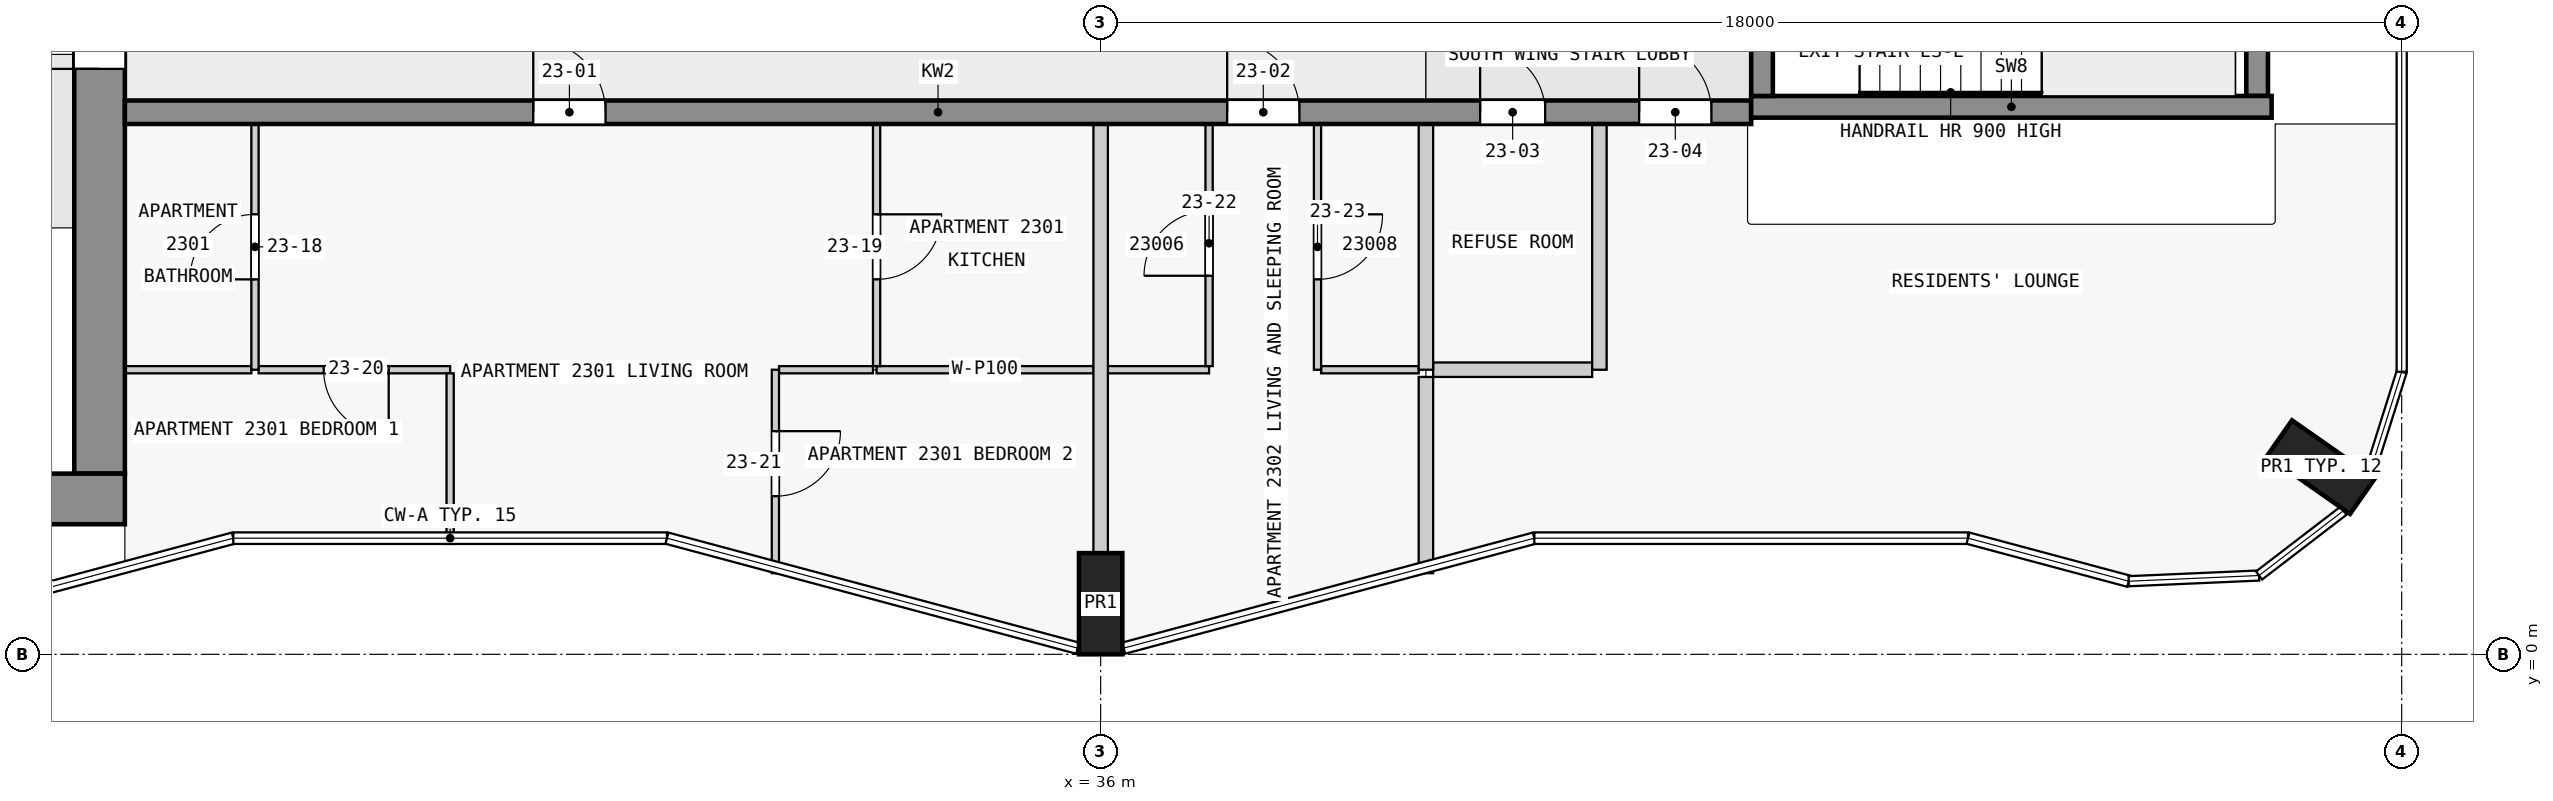
"""IFC4 building model, lengths in metres.
Left out: names, types, materials, properties, quantities, classifications, styles, units other than length and angle.
Written with IfcOpenShell. Run it as: python <this file> out.ifc"""

import sys

from ifc_helpers import new_model, si_unit, direction, frame, frame_2d, origin, origin_2d, place, context, subcontext, project, spatial, rectangle, extrude, element, fill, save


model = new_model("IFC4")
c1 = context("Model", 3, precision=1e-05, world=origin(), true_north=direction((0.0, 1.0)))
c2 = subcontext(c1, "Body", "Model", "MODEL_VIEW")
j1 = project(units=[si_unit("LENGTHUNIT", "METRE"), si_unit("PLANEANGLEUNIT", "RADIAN")], contexts=[c1])
p1 = place(None, origin())
s1 = spatial("IfcSite", under=j1, at=p1, CompositionType="ELEMENT")
p2 = place(p1, origin())
s2 = spatial("IfcBuilding", under=s1, at=p2, CompositionType="ELEMENT")
p3 = place(p2, frame((0.0, 0.0, 92.3)))
s3 = spatial("IfcBuildingStorey", under=s2, at=p3, CompositionType="ELEMENT", Elevation=92.3)
for number, where, z_axis, x_axis in (
    (1, (36.0, 0.7, 0.0), (0.0, 0.0, 1.0), (1.0, 0.0, 0.0)),
    (2, (52.884, 2.59, 0.0), (0.0, 0.0, 1.0), (0.574, 0.819, 0.0)),
):
    element("IfcColumn", number, at=place(p3, frame(where, z_axis=z_axis, x_axis=x_axis)), inside=s3, PredefinedType="COLUMN", context=c2, shape_type="SweptSolid", body=[
        extrude(rectangle(XDim=0.6, YDim=1.4, at=origin_2d()), origin(), (0.0, 0.0, 1.0), 3.5),
    ])
p4 = place(p3, frame((1.6, 2.15, 0.0), z_axis=(0.0, 0.0, 1.0), x_axis=(1.0, 0.0, 0.0)))
e3 = element("IfcWall", 3, at=p4, inside=s3, PredefinedType="SHEAR", context=c2, shape_type="SweptSolid", body=[
    extrude(rectangle(XDim=20.9, YDim=0.7, at=frame_2d((10.45, 0.0))), origin(), (0.0, 0.0, 1.0), 3.25),
])
p5 = place(p3, frame((22.15, 2.5, 0.0), z_axis=(0.0, 0.0, 1.0), x_axis=(0.0, 1.0, 0.0)))
e4 = element("IfcWall", 4, at=p5, inside=s3, PredefinedType="SHEAR", context=c2, shape_type="SweptSolid", body=[
    extrude(rectangle(XDim=14.8, YDim=0.7, at=frame_2d((7.4, 0.0))), origin(), (0.0, 0.0, 1.0), 3.25),
])
p6 = place(p5, frame((5.6, 0.0, 0.0)))
e5 = element("IfcOpeningElement", 5, at=p6, cuts=e4, PredefinedType="OPENING", context=c2, shape_type="SweptSolid", body=[
    extrude(rectangle(XDim=1.8, YDim=2.1, at=frame_2d((0.9, 1.05))), frame((0.0, 0.36, 0.0), z_axis=(0.0, -1.0, 0.0), x_axis=(1.0, 0.0, 0.0)), (0.0, 0.0, 1.0), 0.72),
])
p7 = place(p3, frame((45.15, 7.725, 0.0), z_axis=(0.0, 0.0, 1.0), x_axis=(0.0, 1.0, 0.0)))
e6 = element("IfcWall", 6, at=p7, inside=s3, PredefinedType="SHEAR", context=c2, shape_type="SweptSolid", body=[
    extrude(rectangle(XDim=2.55, YDim=0.3, at=frame_2d((1.275, 0.0))), origin(), (0.0, 0.0, 1.0), 3.5),
])
p8 = place(p7, frame((0.725, 0.0, 0.0)))
e7 = element("IfcOpeningElement", 7, at=p8, cuts=e6, PredefinedType="OPENING", context=c2, shape_type="SweptSolid", body=[
    extrude(rectangle(XDim=1.1, YDim=2.1, at=frame_2d((0.55, 1.05))), frame((0.0, 0.16, 0.0), z_axis=(0.0, -1.0, 0.0), x_axis=(1.0, 0.0, 0.0)), (0.0, 0.0, 1.0), 0.32),
])
p9 = place(p3, frame((52.0, 7.725, 0.0), z_axis=(0.0, 0.0, 1.0), x_axis=(0.0, 1.0, 0.0)))
e8 = element("IfcWall", 8, at=p9, inside=s3, PredefinedType="SHEAR", context=c2, shape_type="SweptSolid", body=[
    extrude(rectangle(XDim=2.55, YDim=0.3, at=frame_2d((1.275, 0.0))), origin(), (0.0, 0.0, 1.0), 3.5),
])
p10 = place(p3, frame((45.0, 7.575, 0.0), z_axis=(0.0, 0.0, 1.0), x_axis=(1.0, 0.0, 0.0)))
e9 = element("IfcWall", 9, at=p10, inside=s3, PredefinedType="SHEAR", context=c2, shape_type="SweptSolid", body=[
    extrude(rectangle(XDim=7.2, YDim=0.3, at=frame_2d((3.6, 0.0))), origin(), (0.0, 0.0, 1.0), 3.5),
])
p11 = place(p3, frame((22.5, 7.5, 0.0), z_axis=(0.0, 0.0, 1.0), x_axis=(1.0, 0.0, 0.0)))
e10 = element("IfcWall", 10, at=p11, inside=s3, PredefinedType="SHEAR", context=c2, shape_type="SweptSolid", body=[
    extrude(rectangle(XDim=22.5, YDim=0.325, at=frame_2d((11.25, 0.0))), origin(), (0.0, 0.0, 1.0), 3.25),
])
p12 = place(p11, frame((5.65, 0.0, 0.0)))
e11 = element("IfcOpeningElement", 11, at=p12, cuts=e10, PredefinedType="OPENING", context=c2, shape_type="SweptSolid", body=[
    extrude(rectangle(XDim=1.0, YDim=2.1, at=frame_2d((0.5, 1.05))), frame((0.0, 0.172, 0.0), z_axis=(0.0, -1.0, 0.0), x_axis=(1.0, 0.0, 0.0)), (0.0, 0.0, 1.0), 0.345),
])
p13 = place(p11, frame((15.25, 0.0, 0.0)))
e12 = element("IfcOpeningElement", 12, at=p13, cuts=e10, PredefinedType="OPENING", context=c2, shape_type="SweptSolid", body=[
    extrude(rectangle(XDim=1.0, YDim=2.1, at=frame_2d((0.5, 1.05))), frame((0.0, 0.172, 0.0), z_axis=(0.0, -1.0, 0.0), x_axis=(1.0, 0.0, 0.0)), (0.0, 0.0, 1.0), 0.345),
])
p14 = place(p11, frame((18.75, 0.0, 0.0)))
e13 = element("IfcOpeningElement", 13, at=p14, cuts=e10, PredefinedType="OPENING", context=c2, shape_type="SweptSolid", body=[
    extrude(rectangle(XDim=0.9, YDim=2.1, at=frame_2d((0.45, 1.05))), frame((0.0, 0.172, 0.0), z_axis=(0.0, -1.0, 0.0), x_axis=(1.0, 0.0, 0.0)), (0.0, 0.0, 1.0), 0.345),
])
p15 = place(p11, frame((20.95, 0.0, 0.0)))
e14 = element("IfcOpeningElement", 14, at=p15, cuts=e10, PredefinedType="OPENING", context=c2, shape_type="SweptSolid", body=[
    extrude(rectangle(XDim=1.0, YDim=2.1, at=frame_2d((0.5, 1.05))), frame((0.0, 0.172, 0.0), z_axis=(0.0, -1.0, 0.0), x_axis=(1.0, 0.0, 0.0)), (0.0, 0.0, 1.0), 0.345),
])
p16 = place(p3, frame((27.0, 3.938, 0.0), z_axis=(0.0, 0.0, 1.0), x_axis=(-1.0, 0.0, 0.0)))
e15 = element("IfcWall", 15, at=p16, inside=s3, PredefinedType="PARTITIONING", context=c2, shape_type="SweptSolid", body=[
    extrude(rectangle(XDim=2.65, YDim=0.1, at=frame_2d((1.325, 0.0))), origin(), (0.0, 0.0, 1.0), 3.25),
])
p17 = place(p16, frame((0.85, 0.0, 0.0)))
e16 = element("IfcOpeningElement", 16, at=p17, cuts=e15, PredefinedType="OPENING", context=c2, shape_type="SweptSolid", body=[
    extrude(rectangle(XDim=0.9, YDim=2.1, at=frame_2d((0.45, 1.05))), frame((0.0, 0.06, 0.0), z_axis=(0.0, -1.0, 0.0), x_axis=(1.0, 0.0, 0.0)), (0.0, 0.0, 1.0), 0.12),
])
p18 = place(p3, frame((32.85, 3.938, 0.0), z_axis=(0.0, 0.0, 1.0), x_axis=(-1.0, 0.0, 0.0)))
e17 = element("IfcWall", 17, at=p18, inside=s3, PredefinedType="PARTITIONING", context=c2, shape_type="SweptSolid", body=[
    extrude(rectangle(XDim=1.3, YDim=0.1, at=frame_2d((0.65, 0.0))), origin(), (0.0, 0.0, 1.0), 3.25),
])
p19 = place(p3, frame((22.5, 3.938, 0.0), z_axis=(0.0, 0.0, 1.0), x_axis=(1.0, 0.0, 0.0)))
e18 = element("IfcWall", 18, at=p19, inside=s3, PredefinedType="PARTITIONING", context=c2, shape_type="SweptSolid", body=[
    extrude(rectangle(XDim=1.75, YDim=0.1, at=frame_2d((0.875, 0.0))), origin(), (0.0, 0.0, 1.0), 3.25),
])
p20 = place(p3, frame((32.9, 3.938, 0.0), z_axis=(0.0, 0.0, 1.0), x_axis=(1.0, 0.0, 0.0)))
e19 = element("IfcWall", 19, at=p20, inside=s3, PredefinedType="PARTITIONING", context=c2, shape_type="SweptSolid", body=[
    extrude(rectangle(XDim=3.0, YDim=0.1, at=frame_2d((1.5, 0.0))), origin(), (0.0, 0.0, 1.0), 3.25),
])
p21 = place(p3, frame((36.1, 3.938, 0.0), z_axis=(0.0, 0.0, 1.0), x_axis=(1.0, 0.0, 0.0)))
e20 = element("IfcWall", 20, at=p21, inside=s3, PredefinedType="PARTITIONING", context=c2, shape_type="SweptSolid", body=[
    extrude(rectangle(XDim=1.4, YDim=0.1, at=frame_2d((0.7, 0.0))), origin(), (0.0, 0.0, 1.0), 3.25),
])
p22 = place(p3, frame((39.05, 3.938, 0.0), z_axis=(0.0, 0.0, 1.0), x_axis=(1.0, 0.0, 0.0)))
e21 = element("IfcWall", 21, at=p22, inside=s3, PredefinedType="PARTITIONING", context=c2, shape_type="SweptSolid", body=[
    extrude(rectangle(XDim=1.35, YDim=0.1, at=frame_2d((0.675, 0.0))), origin(), (0.0, 0.0, 1.0), 3.25),
])
p23 = place(p3, frame((40.6, 3.938, 0.0), z_axis=(0.0, 0.0, 1.0), x_axis=(1.0, 0.0, 0.0)))
e22 = element("IfcWall", 22, at=p23, inside=s3, PredefinedType="PARTITIONING", context=c2, shape_type="SweptSolid", body=[
    extrude(rectangle(XDim=2.2, YDim=0.2, at=frame_2d((1.1, 0.0))), origin(), (0.0, 0.0, 1.0), 3.25),
])
p24 = place(p3, frame((24.3, 3.938, 0.0), z_axis=(0.0, 0.0, 1.0), x_axis=(0.0, 1.0, 0.0)))
e23 = element("IfcWall", 23, at=p24, inside=s3, PredefinedType="PARTITIONING", context=c2, shape_type="SweptSolid", body=[
    extrude(rectangle(XDim=3.4, YDim=0.1, at=frame_2d((1.7, 0.0))), origin(), (0.0, 0.0, 1.0), 3.25),
])
p25 = place(p24, frame((1.25, 0.0, 0.0)))
e24 = element("IfcOpeningElement", 24, at=p25, cuts=e23, PredefinedType="OPENING", context=c2, shape_type="SweptSolid", body=[
    extrude(rectangle(XDim=0.9, YDim=2.1, at=frame_2d((0.45, 1.05))), frame((0.0, 0.06, 0.0), z_axis=(0.0, -1.0, 0.0), x_axis=(1.0, 0.0, 0.0)), (0.0, 0.0, 1.0), 0.12),
])
p26 = place(p3, frame((27.0, 1.527, 0.0), z_axis=(0.0, 0.0, 1.0), x_axis=(0.0, 1.0, 0.0)))
e25 = element("IfcWall", 25, at=p26, inside=s3, PredefinedType="PARTITIONING", context=c2, shape_type="SweptSolid", body=[
    extrude(rectangle(XDim=2.361, YDim=0.1, at=frame_2d((1.18, 0.0))), origin(), (0.0, 0.0, 1.0), 3.25),
])
p27 = place(p3, frame((31.5, 3.938, 0.0), z_axis=(0.0, 0.0, 1.0), x_axis=(0.0, -1.0, 0.0)))
e26 = element("IfcWall", 26, at=p27, inside=s3, PredefinedType="PARTITIONING", context=c2, shape_type="SweptSolid", body=[
    extrude(rectangle(XDim=2.815, YDim=0.1, at=frame_2d((1.408, 0.0))), origin(), (0.0, 0.0, 1.0), 3.25),
])
p28 = place(p27, frame((0.85, 0.0, 0.0)))
e27 = element("IfcOpeningElement", 27, at=p28, cuts=e26, PredefinedType="OPENING", context=c2, shape_type="SweptSolid", body=[
    extrude(rectangle(XDim=0.9, YDim=2.1, at=frame_2d((0.45, 1.05))), frame((0.0, 0.06, 0.0), z_axis=(0.0, -1.0, 0.0), x_axis=(1.0, 0.0, 0.0)), (0.0, 0.0, 1.0), 0.12),
])
p29 = place(p3, frame((32.9, 7.337, 0.0), z_axis=(0.0, 0.0, 1.0), x_axis=(0.0, -1.0, 0.0)))
e28 = element("IfcWall", 28, at=p29, inside=s3, PredefinedType="PARTITIONING", context=c2, shape_type="SweptSolid", body=[
    extrude(rectangle(XDim=3.35, YDim=0.1, at=frame_2d((1.675, 0.0))), origin(), (0.0, 0.0, 1.0), 3.25),
])
p30 = place(p29, frame((1.25, 0.0, 0.0)))
e29 = element("IfcOpeningElement", 29, at=p30, cuts=e28, PredefinedType="OPENING", context=c2, shape_type="SweptSolid", body=[
    extrude(rectangle(XDim=0.9, YDim=2.1, at=frame_2d((0.45, 1.05))), frame((0.0, 0.06, 0.0), z_axis=(0.0, -1.0, 0.0), x_axis=(1.0, 0.0, 0.0)), (0.0, 0.0, 1.0), 0.12),
])
p31 = place(p3, frame((36.0, 1.4, 0.0), z_axis=(0.0, 0.0, 1.0), x_axis=(0.0, 1.0, 0.0)))
e30 = element("IfcWall", 30, at=p31, inside=s3, PredefinedType="PARTITIONING", context=c2, shape_type="SweptSolid", body=[
    extrude(rectangle(XDim=5.938, YDim=0.2, at=frame_2d((2.969, 0.0))), origin(), (0.0, 0.0, 1.0), 3.25),
])
p32 = place(p3, frame((37.5, 3.988, 0.0), z_axis=(0.0, 0.0, 1.0), x_axis=(0.0, 1.0, 0.0)))
e31 = element("IfcWall", 31, at=p32, inside=s3, PredefinedType="PARTITIONING", context=c2, shape_type="SweptSolid", body=[
    extrude(rectangle(XDim=3.35, YDim=0.1, at=frame_2d((1.675, 0.0))), origin(), (0.0, 0.0, 1.0), 3.25),
])
p33 = place(p32, frame((1.25, 0.0, 0.0)))
e32 = element("IfcOpeningElement", 32, at=p33, cuts=e31, PredefinedType="OPENING", context=c2, shape_type="SweptSolid", body=[
    extrude(rectangle(XDim=0.9, YDim=2.1, at=frame_2d((0.45, 1.05))), frame((0.0, 0.06, 0.0), z_axis=(0.0, -1.0, 0.0), x_axis=(1.0, 0.0, 0.0)), (0.0, 0.0, 1.0), 0.12),
])
p34 = place(p3, frame((39.0, 7.337, 0.0), z_axis=(0.0, 0.0, 1.0), x_axis=(0.0, -1.0, 0.0)))
e33 = element("IfcWall", 33, at=p34, inside=s3, PredefinedType="PARTITIONING", context=c2, shape_type="SweptSolid", body=[
    extrude(rectangle(XDim=3.4, YDim=0.1, at=frame_2d((1.7, 0.0))), origin(), (0.0, 0.0, 1.0), 3.25),
])
p35 = place(p34, frame((1.25, 0.0, 0.0)))
e34 = element("IfcOpeningElement", 34, at=p35, cuts=e33, PredefinedType="OPENING", context=c2, shape_type="SweptSolid", body=[
    extrude(rectangle(XDim=0.9, YDim=2.1, at=frame_2d((0.45, 1.05))), frame((0.0, 0.06, 0.0), z_axis=(0.0, -1.0, 0.0), x_axis=(1.0, 0.0, 0.0)), (0.0, 0.0, 1.0), 0.12),
])
p36 = place(p3, frame((40.5, 3.837, 0.0), z_axis=(0.0, 0.0, 1.0), x_axis=(0.0, -1.0, 0.0)))
e35 = element("IfcWall", 35, at=p36, inside=s3, PredefinedType="PARTITIONING", context=c2, shape_type="SweptSolid", body=[
    extrude(rectangle(XDim=2.715, YDim=0.2, at=frame_2d((1.357, 0.0))), origin(), (0.0, 0.0, 1.0), 3.25),
])
for number, where, z_axis, x_axis in (
    (36, (40.5, 3.938, 0.0), (0.0, 0.0, 1.0), (0.0, 1.0, 0.0)),
    (37, (42.9, 3.938, 0.0), (0.0, 0.0, 1.0), (0.0, 1.0, 0.0)),
):
    element("IfcWall", number, at=place(p3, frame(where, z_axis=z_axis, x_axis=x_axis)), inside=s3, PredefinedType="PARTITIONING", context=c2, shape_type="SweptSolid", body=[
        extrude(rectangle(XDim=3.4, YDim=0.2, at=frame_2d((1.7, 0.0))), origin(), (0.0, 0.0, 1.0), 3.25),
    ])
p37 = place(p6, origin())
e38 = element("IfcDoor", 38, at=p37, inside=s3, OperationType="DOUBLE_DOOR_SINGLE_SWING", PredefinedType="DOOR", context=c2, shape_type="SweptSolid", body=[
    extrude(rectangle(XDim=1.8, YDim=2.1, at=frame_2d((0.9, 1.05))), frame((0.0, 0.025, 0.0), z_axis=(0.0, -1.0, 0.0), x_axis=(1.0, 0.0, 0.0)), (0.0, 0.0, 1.0), 0.05),
])
fill(e5, e38)
p38 = place(p12, origin())
e39 = element("IfcDoor", 39, at=p38, inside=s3, OperationType="SINGLE_SWING_LEFT", PredefinedType="DOOR", context=c2, shape_type="SweptSolid", body=[
    extrude(rectangle(XDim=1.0, YDim=2.1, at=frame_2d((0.5, 1.05))), frame((0.0, 0.025, 0.0), z_axis=(0.0, -1.0, 0.0), x_axis=(1.0, 0.0, 0.0)), (0.0, 0.0, 1.0), 0.05),
])
fill(e11, e39)
p39 = place(p13, origin())
e40 = element("IfcDoor", 40, at=p39, inside=s3, OperationType="SINGLE_SWING_RIGHT", PredefinedType="DOOR", context=c2, shape_type="SweptSolid", body=[
    extrude(rectangle(XDim=1.0, YDim=2.1, at=frame_2d((0.5, 1.05))), frame((0.0, 0.025, 0.0), z_axis=(0.0, -1.0, 0.0), x_axis=(1.0, 0.0, 0.0)), (0.0, 0.0, 1.0), 0.05),
])
fill(e12, e40)
p40 = place(p14, origin())
e41 = element("IfcDoor", 41, at=p40, inside=s3, OperationType="SINGLE_SWING_RIGHT", PredefinedType="DOOR", context=c2, shape_type="SweptSolid", body=[
    extrude(rectangle(XDim=0.9, YDim=2.1, at=frame_2d((0.45, 1.05))), frame((0.0, 0.025, 0.0), z_axis=(0.0, -1.0, 0.0), x_axis=(1.0, 0.0, 0.0)), (0.0, 0.0, 1.0), 0.05),
])
fill(e13, e41)
p41 = place(p15, origin())
e42 = element("IfcDoor", 42, at=p41, inside=s3, OperationType="SINGLE_SWING_RIGHT", PredefinedType="DOOR", context=c2, shape_type="SweptSolid", body=[
    extrude(rectangle(XDim=1.0, YDim=2.1, at=frame_2d((0.5, 1.05))), frame((0.0, 0.025, 0.0), z_axis=(0.0, -1.0, 0.0), x_axis=(1.0, 0.0, 0.0)), (0.0, 0.0, 1.0), 0.05),
])
fill(e14, e42)
p42 = place(p25, origin())
e43 = element("IfcDoor", 43, at=p42, inside=s3, OperationType="SINGLE_SWING_LEFT", PredefinedType="DOOR", context=c2, shape_type="SweptSolid", body=[
    extrude(rectangle(XDim=0.9, YDim=2.1, at=frame_2d((0.45, 1.05))), frame((0.0, 0.025, 0.0), z_axis=(0.0, -1.0, 0.0), x_axis=(1.0, 0.0, 0.0)), (0.0, 0.0, 1.0), 0.05),
])
fill(e24, e43)
p43 = place(p30, origin())
e44 = element("IfcDoor", 44, at=p43, inside=s3, OperationType="SINGLE_SWING_RIGHT", PredefinedType="DOOR", context=c2, shape_type="SweptSolid", body=[
    extrude(rectangle(XDim=0.9, YDim=2.1, at=frame_2d((0.45, 1.05))), frame((0.0, 0.025, 0.0), z_axis=(0.0, -1.0, 0.0), x_axis=(1.0, 0.0, 0.0)), (0.0, 0.0, 1.0), 0.05),
])
fill(e29, e44)
p44 = place(p17, origin())
e45 = element("IfcDoor", 45, at=p44, inside=s3, OperationType="SINGLE_SWING_LEFT", PredefinedType="DOOR", context=c2, shape_type="SweptSolid", body=[
    extrude(rectangle(XDim=0.9, YDim=2.1, at=frame_2d((0.45, 1.05))), frame((0.0, 0.025, 0.0), z_axis=(0.0, -1.0, 0.0), x_axis=(1.0, 0.0, 0.0)), (0.0, 0.0, 1.0), 0.05),
])
fill(e16, e45)
p45 = place(p28, origin())
e46 = element("IfcDoor", 46, at=p45, inside=s3, OperationType="SINGLE_SWING_LEFT", PredefinedType="DOOR", context=c2, shape_type="SweptSolid", body=[
    extrude(rectangle(XDim=0.9, YDim=2.1, at=frame_2d((0.45, 1.05))), frame((0.0, 0.025, 0.0), z_axis=(0.0, -1.0, 0.0), x_axis=(1.0, 0.0, 0.0)), (0.0, 0.0, 1.0), 0.05),
])
fill(e27, e46)
p46 = place(p33, origin())
e47 = element("IfcDoor", 47, at=p46, inside=s3, OperationType="SINGLE_SWING_RIGHT", PredefinedType="DOOR", context=c2, shape_type="SweptSolid", body=[
    extrude(rectangle(XDim=0.9, YDim=2.1, at=frame_2d((0.45, 1.05))), frame((0.0, 0.025, 0.0), z_axis=(0.0, -1.0, 0.0), x_axis=(1.0, 0.0, 0.0)), (0.0, 0.0, 1.0), 0.05),
])
fill(e32, e47)
p47 = place(p35, origin())
e48 = element("IfcDoor", 48, at=p47, inside=s3, OperationType="SINGLE_SWING_LEFT", PredefinedType="DOOR", context=c2, shape_type="SweptSolid", body=[
    extrude(rectangle(XDim=0.9, YDim=2.1, at=frame_2d((0.45, 1.05))), frame((0.0, 0.025, 0.0), z_axis=(0.0, -1.0, 0.0), x_axis=(1.0, 0.0, 0.0)), (0.0, 0.0, 1.0), 0.05),
])
fill(e34, e48)
save(model, sys.argv[1])
